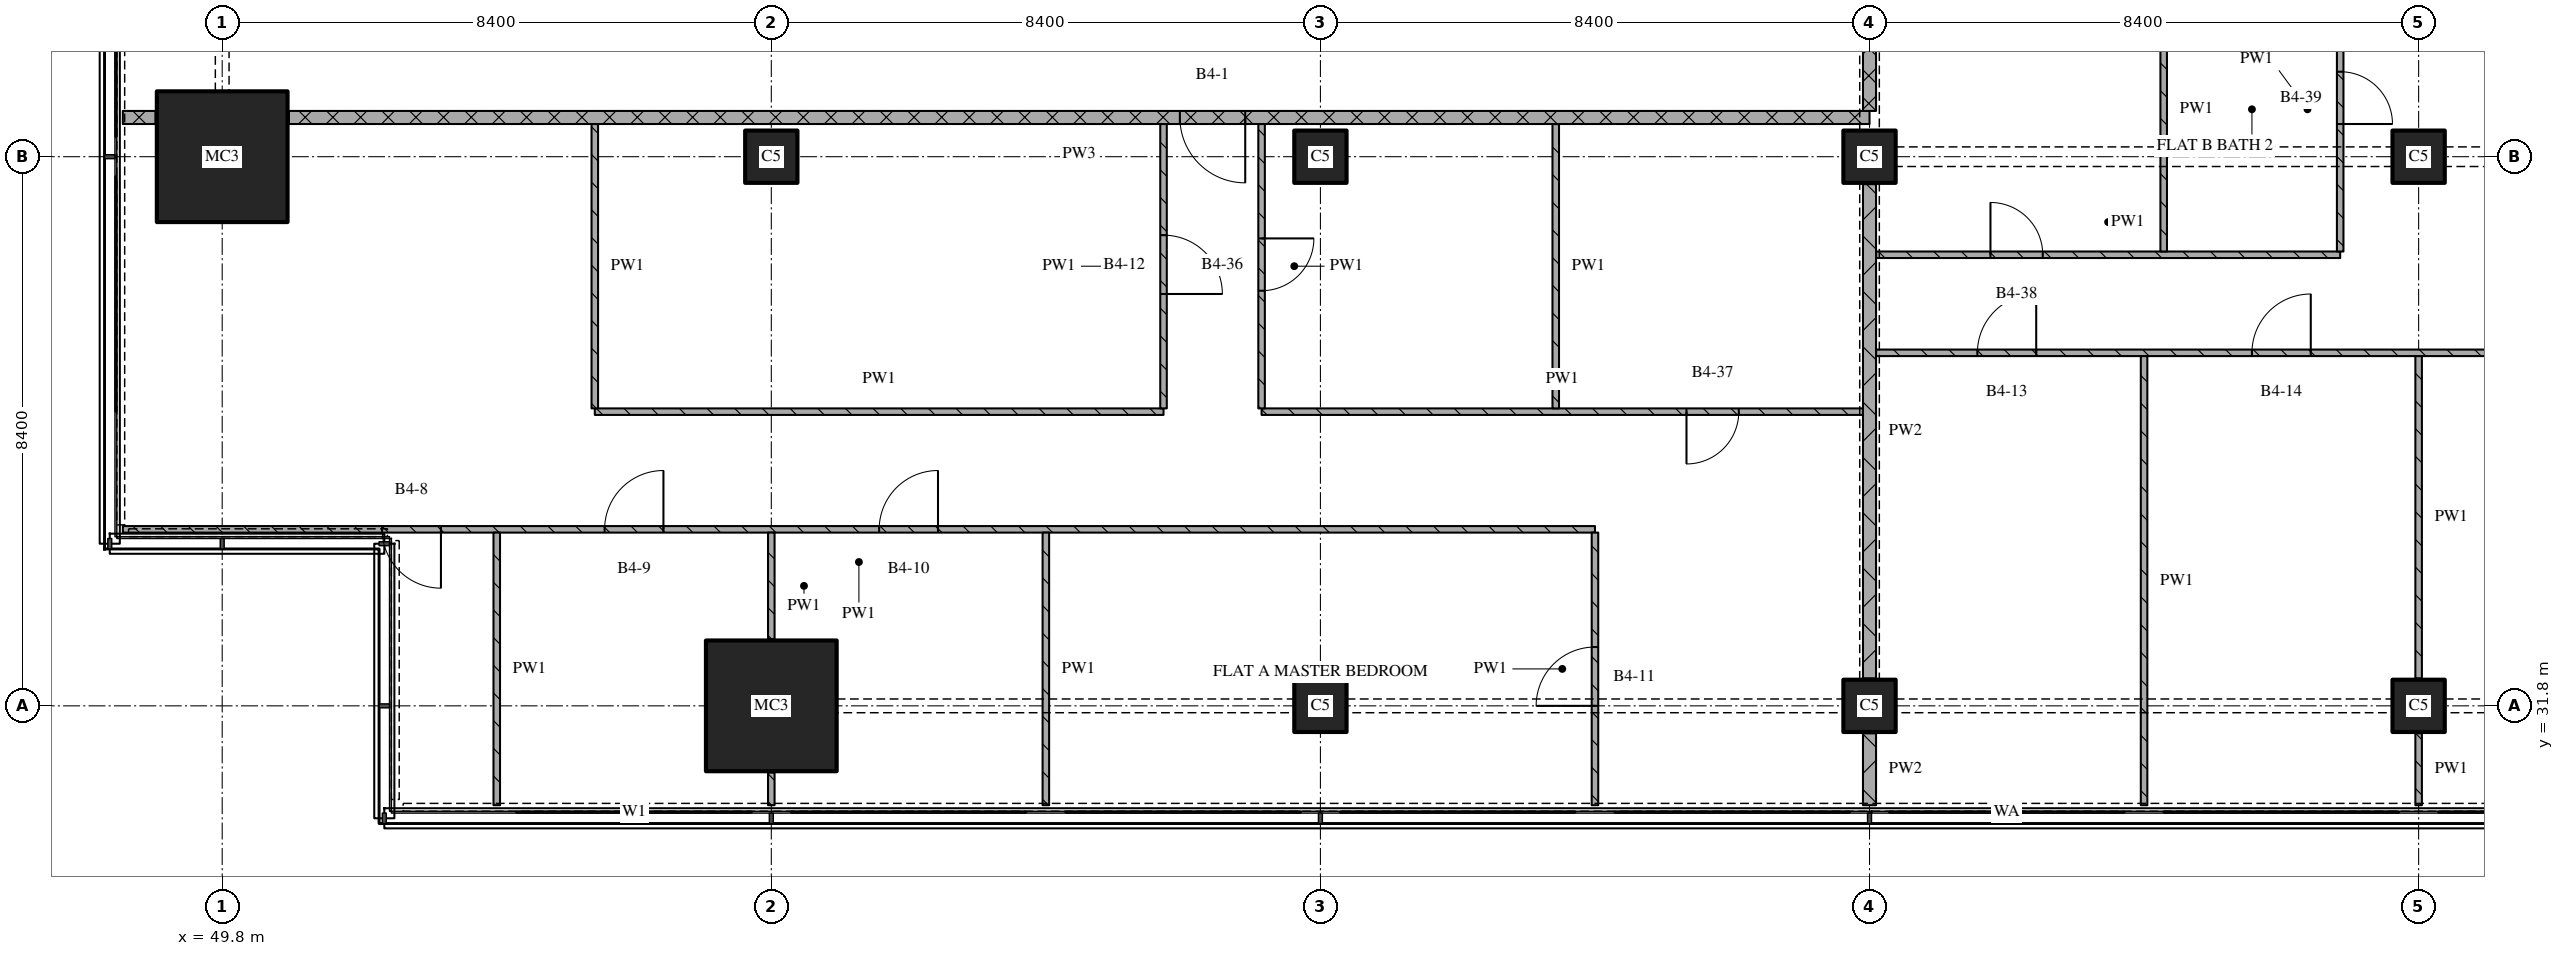
"""IFC4 building model, lengths in metres.
Left out: names, types, materials, properties, quantities, classifications, styles, units other than length and angle.
Written with IfcOpenShell. Run it as: python <this file> out.ifc"""

import sys

from ifc_helpers import new_model, si_unit, direction, frame, frame_2d, origin, origin_2d, place, context, subcontext, project, spatial, rectangle, extrude, element, fill, save


model = new_model("IFC4")
c1 = context("Model", 3, precision=1e-05, world=origin(), true_north=direction((0.0, 1.0)))
c2 = subcontext(c1, "Body", "Model", "MODEL_VIEW")
j1 = project(units=[si_unit("LENGTHUNIT", "METRE"), si_unit("PLANEANGLEUNIT", "RADIAN")], contexts=[c1])
p1 = place(None, origin())
s1 = spatial("IfcSite", under=j1, at=p1, CompositionType="ELEMENT")
p2 = place(p1, origin())
s2 = spatial("IfcBuilding", under=s1, at=p2, CompositionType="ELEMENT")
p3 = place(p2, frame((0.0, 0.0, 127.65)))
s3 = spatial("IfcBuildingStorey", under=s2, at=p3, CompositionType="ELEMENT", Elevation=127.65)
for number, where, z_axis, x_axis in (
    (1, (49.8, 40.2, 0.0), (0.0, 0.0, 1.0), (1.0, 0.0, 0.0)),
    (2, (58.2, 31.8, 0.0), (0.0, 0.0, 1.0), (1.0, 0.0, 0.0)),
):
    element("IfcColumn", number, at=place(p3, frame(where, z_axis=z_axis, x_axis=x_axis)), inside=s3, PredefinedType="COLUMN", context=c2, shape_type="SweptSolid", body=[
        extrude(rectangle(XDim=2.0, YDim=2.0, at=origin_2d()), origin(), (0.0, 0.0, 1.0), 3.6),
    ])
for number, where, z_axis, x_axis in (
    (3, (58.2, 40.2, 0.0), (0.0, 0.0, 1.0), (1.0, 0.0, 0.0)),
    (4, (66.6, 31.8, 0.0), (0.0, 0.0, 1.0), (1.0, 0.0, 0.0)),
    (5, (66.6, 40.2, 0.0), (0.0, 0.0, 1.0), (1.0, 0.0, 0.0)),
    (6, (75.0, 31.8, 0.0), (0.0, 0.0, 1.0), (1.0, 0.0, 0.0)),
    (7, (75.0, 40.2, 0.0), (0.0, 0.0, 1.0), (1.0, 0.0, 0.0)),
    (8, (83.4, 31.8, 0.0), (0.0, 0.0, 1.0), (1.0, 0.0, 0.0)),
    (9, (83.4, 40.2, 0.0), (0.0, 0.0, 1.0), (1.0, 0.0, 0.0)),
):
    element("IfcColumn", number, at=place(p3, frame(where, z_axis=z_axis, x_axis=x_axis)), inside=s3, PredefinedType="COLUMN", context=c2, shape_type="SweptSolid", body=[
        extrude(rectangle(XDim=0.8, YDim=0.8, at=origin_2d()), origin(), (0.0, 0.0, 1.0), 3.6),
    ])
p4 = place(p3, frame((70.8, 34.5, 0.0), z_axis=(0.0, 0.0, 1.0), x_axis=(-1.0, 0.0, 0.0)))
e10 = element("IfcWall", 10, at=p4, inside=s3, PredefinedType="PARTITIONING", context=c2, shape_type="SweptSolid", body=[
    extrude(rectangle(XDim=22.52, YDim=0.1, at=frame_2d((11.26, 0.0))), origin(), (0.0, 0.0, 1.0), 3.32),
])
p5 = place(p4, frame((10.05, 0.0, 0.0)))
e11 = element("IfcOpeningElement", 11, at=p5, cuts=e10, PredefinedType="OPENING", context=c2, shape_type="SweptSolid", body=[
    extrude(rectangle(XDim=0.9, YDim=2.1, at=frame_2d((0.45, 1.05))), frame((0.0, 0.06, 0.0), z_axis=(0.0, -1.0, 0.0), x_axis=(1.0, 0.0, 0.0)), (0.0, 0.0, 1.0), 0.12),
])
p6 = place(p4, frame((14.25, 0.0, 0.0)))
e12 = element("IfcOpeningElement", 12, at=p6, cuts=e10, PredefinedType="OPENING", context=c2, shape_type="SweptSolid", body=[
    extrude(rectangle(XDim=0.9, YDim=2.1, at=frame_2d((0.45, 1.05))), frame((0.0, 0.06, 0.0), z_axis=(0.0, -1.0, 0.0), x_axis=(1.0, 0.0, 0.0)), (0.0, 0.0, 1.0), 0.12),
])
p7 = place(p4, frame((17.654, 0.0, 0.0)))
e13 = element("IfcOpeningElement", 13, at=p7, cuts=e10, PredefinedType="OPENING", context=c2, shape_type="SweptSolid", body=[
    extrude(rectangle(XDim=0.9, YDim=2.1, at=frame_2d((0.45, 1.05))), frame((0.0, 0.06, 0.0), z_axis=(0.0, -1.0, 0.0), x_axis=(1.0, 0.0, 0.0)), (0.0, 0.0, 1.0), 0.12),
])
p8 = place(p3, frame((55.5, 36.3, 0.0), z_axis=(0.0, 0.0, 1.0), x_axis=(1.0, 0.0, 0.0)))
e14 = element("IfcWall", 14, at=p8, inside=s3, PredefinedType="PARTITIONING", context=c2, shape_type="SweptSolid", body=[
    extrude(rectangle(XDim=8.7, YDim=0.1, at=frame_2d((4.35, 0.0))), origin(), (0.0, 0.0, 1.0), 3.32),
])
p9 = place(p3, frame((65.7, 36.3, 0.0), z_axis=(0.0, 0.0, 1.0), x_axis=(1.0, 0.0, 0.0)))
e15 = element("IfcWall", 15, at=p9, inside=s3, PredefinedType="PARTITIONING", context=c2, shape_type="SweptSolid", body=[
    extrude(rectangle(XDim=9.2, YDim=0.1, at=frame_2d((4.6, 0.0))), origin(), (0.0, 0.0, 1.0), 3.32),
])
p10 = place(p9, frame((6.5, 0.0, 0.0)))
e16 = element("IfcOpeningElement", 16, at=p10, cuts=e15, PredefinedType="OPENING", context=c2, shape_type="SweptSolid", body=[
    extrude(rectangle(XDim=0.8, YDim=2.1, at=frame_2d((0.4, 1.05))), frame((0.0, 0.06, 0.0), z_axis=(0.0, -1.0, 0.0), x_axis=(1.0, 0.0, 0.0)), (0.0, 0.0, 1.0), 0.12),
])
p11 = place(p3, frame((96.0, 37.2, 0.0), z_axis=(0.0, 0.0, 1.0), x_axis=(-1.0, 0.0, 0.0)))
e17 = element("IfcWall", 17, at=p11, inside=s3, PredefinedType="PARTITIONING", context=c2, shape_type="SweptSolid", body=[
    extrude(rectangle(XDim=20.9, YDim=0.1, at=frame_2d((10.45, 0.0))), origin(), (0.0, 0.0, 1.0), 3.32),
])
p12 = place(p11, frame((10.05, 0.0, 0.0)))
e18 = element("IfcOpeningElement", 18, at=p12, cuts=e17, PredefinedType="OPENING", context=c2, shape_type="SweptSolid", body=[
    extrude(rectangle(XDim=0.9, YDim=2.1, at=frame_2d((0.45, 1.05))), frame((0.0, 0.06, 0.0), z_axis=(0.0, -1.0, 0.0), x_axis=(1.0, 0.0, 0.0)), (0.0, 0.0, 1.0), 0.12),
])
p13 = place(p11, frame((14.25, 0.0, 0.0)))
e19 = element("IfcOpeningElement", 19, at=p13, cuts=e17, PredefinedType="OPENING", context=c2, shape_type="SweptSolid", body=[
    extrude(rectangle(XDim=0.9, YDim=2.1, at=frame_2d((0.45, 1.05))), frame((0.0, 0.06, 0.0), z_axis=(0.0, -1.0, 0.0), x_axis=(1.0, 0.0, 0.0)), (0.0, 0.0, 1.0), 0.12),
])
p14 = place(p11, frame((18.45, 0.0, 0.0)))
e20 = element("IfcOpeningElement", 20, at=p14, cuts=e17, PredefinedType="OPENING", context=c2, shape_type="SweptSolid", body=[
    extrude(rectangle(XDim=0.9, YDim=2.1, at=frame_2d((0.45, 1.05))), frame((0.0, 0.06, 0.0), z_axis=(0.0, -1.0, 0.0), x_axis=(1.0, 0.0, 0.0)), (0.0, 0.0, 1.0), 0.12),
])
p15 = place(p3, frame((75.1, 38.7, 0.0), z_axis=(0.0, 0.0, 1.0), x_axis=(1.0, 0.0, 0.0)))
e21 = element("IfcWall", 21, at=p15, inside=s3, PredefinedType="PARTITIONING", context=c2, shape_type="SweptSolid", body=[
    extrude(rectangle(XDim=7.1, YDim=0.1, at=frame_2d((3.55, 0.0))), origin(), (0.0, 0.0, 1.0), 3.32),
])
p16 = place(p15, frame((1.75, 0.0, 0.0)))
e22 = element("IfcOpeningElement", 22, at=p16, cuts=e21, PredefinedType="OPENING", context=c2, shape_type="SweptSolid", body=[
    extrude(rectangle(XDim=0.8, YDim=2.1, at=frame_2d((0.4, 1.05))), frame((0.0, 0.06, 0.0), z_axis=(0.0, -1.0, 0.0), x_axis=(1.0, 0.0, 0.0)), (0.0, 0.0, 1.0), 0.12),
])
p17 = place(p3, frame((48.28, 40.8, 0.0), z_axis=(0.0, 0.0, 1.0), x_axis=(1.0, 0.0, 0.0)))
e23 = element("IfcWall", 23, at=p17, inside=s3, PredefinedType="PARTITIONING", context=c2, shape_type="SweptSolid", body=[
    extrude(rectangle(XDim=0.5, YDim=0.2, at=frame_2d((0.25, 0.0))), origin(), (0.0, 0.0, 1.0), 3.32),
])
p18 = place(p3, frame((75.0, 40.8, 0.0), z_axis=(0.0, 0.0, 1.0), x_axis=(-1.0, 0.0, 0.0)))
e24 = element("IfcWall", 24, at=p18, inside=s3, PredefinedType="PARTITIONING", context=c2, shape_type="SweptSolid", body=[
    extrude(rectangle(XDim=24.18, YDim=0.2, at=frame_2d((12.09, 0.0))), origin(), (0.0, 0.0, 1.0), 3.32),
])
p19 = place(p18, frame((9.55, 0.0, 0.0)))
e25 = element("IfcOpeningElement", 25, at=p19, cuts=e24, PredefinedType="OPENING", context=c2, shape_type="SweptSolid", body=[
    extrude(rectangle(XDim=1.0, YDim=2.1, at=frame_2d((0.5, 1.05))), frame((0.0, 0.11, 0.0), z_axis=(0.0, -1.0, 0.0), x_axis=(1.0, 0.0, 0.0)), (0.0, 0.0, 1.0), 0.22),
])
p20 = place(p3, frame((54.0, 34.45, 0.0), z_axis=(0.0, 0.0, 1.0), x_axis=(0.0, -1.0, 0.0)))
e26 = element("IfcWall", 26, at=p20, inside=s3, PredefinedType="PARTITIONING", context=c2, shape_type="SweptSolid", body=[
    extrude(rectangle(XDim=4.17, YDim=0.1, at=frame_2d((2.085, 0.0))), origin(), (0.0, 0.0, 1.0), 3.32),
])
p21 = place(p3, frame((55.5, 40.7, 0.0), z_axis=(0.0, 0.0, 1.0), x_axis=(0.0, -1.0, 0.0)))
e27 = element("IfcWall", 27, at=p21, inside=s3, PredefinedType="PARTITIONING", context=c2, shape_type="SweptSolid", body=[
    extrude(rectangle(XDim=4.35, YDim=0.1, at=frame_2d((2.175, 0.0))), origin(), (0.0, 0.0, 1.0), 3.32),
])
p22 = place(p3, frame((58.2, 30.78, 0.0), z_axis=(0.0, 0.0, 1.0), x_axis=(0.0, -1.0, 0.0)))
e28 = element("IfcWall", 28, at=p22, inside=s3, PredefinedType="PARTITIONING", context=c2, shape_type="SweptSolid", body=[
    extrude(rectangle(XDim=0.5, YDim=0.1, at=frame_2d((0.25, 0.0))), origin(), (0.0, 0.0, 1.0), 3.32),
])
p23 = place(p3, frame((58.2, 34.45, 0.0), z_axis=(0.0, 0.0, 1.0), x_axis=(0.0, -1.0, 0.0)))
e29 = element("IfcWall", 29, at=p23, inside=s3, PredefinedType="PARTITIONING", context=c2, shape_type="SweptSolid", body=[
    extrude(rectangle(XDim=1.63, YDim=0.1, at=frame_2d((0.815, 0.0))), origin(), (0.0, 0.0, 1.0), 3.32),
])
p24 = place(p3, frame((62.4, 34.45, 0.0), z_axis=(0.0, 0.0, 1.0), x_axis=(0.0, -1.0, 0.0)))
e30 = element("IfcWall", 30, at=p24, inside=s3, PredefinedType="PARTITIONING", context=c2, shape_type="SweptSolid", body=[
    extrude(rectangle(XDim=4.17, YDim=0.1, at=frame_2d((2.085, 0.0))), origin(), (0.0, 0.0, 1.0), 3.32),
])
p25 = place(p3, frame((64.2, 36.35, 0.0), z_axis=(0.0, 0.0, 1.0), x_axis=(0.0, 1.0, 0.0)))
e31 = element("IfcWall", 31, at=p25, inside=s3, PredefinedType="PARTITIONING", context=c2, shape_type="SweptSolid", body=[
    extrude(rectangle(XDim=4.35, YDim=0.1, at=frame_2d((2.175, 0.0))), origin(), (0.0, 0.0, 1.0), 3.32),
])
p26 = place(p25, frame((1.75, 0.0, 0.0)))
e32 = element("IfcOpeningElement", 32, at=p26, cuts=e31, PredefinedType="OPENING", context=c2, shape_type="SweptSolid", body=[
    extrude(rectangle(XDim=0.9, YDim=2.1, at=frame_2d((0.45, 1.05))), frame((0.0, 0.06, 0.0), z_axis=(0.0, -1.0, 0.0), x_axis=(1.0, 0.0, 0.0)), (0.0, 0.0, 1.0), 0.12),
])
p27 = place(p3, frame((65.7, 40.7, 0.0), z_axis=(0.0, 0.0, 1.0), x_axis=(0.0, -1.0, 0.0)))
e33 = element("IfcWall", 33, at=p27, inside=s3, PredefinedType="PARTITIONING", context=c2, shape_type="SweptSolid", body=[
    extrude(rectangle(XDim=4.35, YDim=0.1, at=frame_2d((2.175, 0.0))), origin(), (0.0, 0.0, 1.0), 3.32),
])
p28 = place(p27, frame((1.75, 0.0, 0.0)))
e34 = element("IfcOpeningElement", 34, at=p28, cuts=e33, PredefinedType="OPENING", context=c2, shape_type="SweptSolid", body=[
    extrude(rectangle(XDim=0.8, YDim=2.1, at=frame_2d((0.4, 1.05))), frame((0.0, 0.06, 0.0), z_axis=(0.0, -1.0, 0.0), x_axis=(1.0, 0.0, 0.0)), (0.0, 0.0, 1.0), 0.12),
])
p29 = place(p3, frame((70.2, 40.7, 0.0), z_axis=(0.0, 0.0, 1.0), x_axis=(0.0, -1.0, 0.0)))
e35 = element("IfcWall", 35, at=p29, inside=s3, PredefinedType="PARTITIONING", context=c2, shape_type="SweptSolid", body=[
    extrude(rectangle(XDim=4.35, YDim=0.1, at=frame_2d((2.175, 0.0))), origin(), (0.0, 0.0, 1.0), 3.32),
])
p30 = place(p3, frame((70.8, 30.28, 0.0), z_axis=(0.0, 0.0, 1.0), x_axis=(0.0, 1.0, 0.0)))
e36 = element("IfcWall", 36, at=p30, inside=s3, PredefinedType="PARTITIONING", context=c2, shape_type="SweptSolid", body=[
    extrude(rectangle(XDim=4.17, YDim=0.1, at=frame_2d((2.085, 0.0))), origin(), (0.0, 0.0, 1.0), 3.32),
])
p31 = place(p30, frame((1.52, 0.0, 0.0)))
e37 = element("IfcOpeningElement", 37, at=p31, cuts=e36, PredefinedType="OPENING", context=c2, shape_type="SweptSolid", body=[
    extrude(rectangle(XDim=0.9, YDim=2.1, at=frame_2d((0.45, 1.05))), frame((0.0, 0.06, 0.0), z_axis=(0.0, -1.0, 0.0), x_axis=(1.0, 0.0, 0.0)), (0.0, 0.0, 1.0), 0.12),
])
p32 = place(p3, frame((75.0, 43.1, 0.0), z_axis=(0.0, 0.0, 1.0), x_axis=(0.0, -1.0, 0.0)))
e38 = element("IfcWall", 38, at=p32, inside=s3, PredefinedType="PARTITIONING", context=c2, shape_type="SweptSolid", body=[
    extrude(rectangle(XDim=2.2, YDim=0.2, at=frame_2d((1.1, 0.0))), origin(), (0.0, 0.0, 1.0), 2.43),
])
p33 = place(p3, frame((75.0, 31.38, 0.0), z_axis=(0.0, 0.0, 1.0), x_axis=(0.0, -1.0, 0.0)))
e39 = element("IfcWall", 39, at=p33, inside=s3, PredefinedType="PARTITIONING", context=c2, shape_type="SweptSolid", body=[
    extrude(rectangle(XDim=1.1, YDim=0.2, at=frame_2d((0.55, 0.0))), origin(), (0.0, 0.0, 1.0), 3.32),
])
p34 = place(p3, frame((75.0, 39.78, 0.0), z_axis=(0.0, 0.0, 1.0), x_axis=(0.0, -1.0, 0.0)))
e40 = element("IfcWall", 40, at=p34, inside=s3, PredefinedType="PARTITIONING", context=c2, shape_type="SweptSolid", body=[
    extrude(rectangle(XDim=7.56, YDim=0.2, at=frame_2d((3.78, 0.0))), origin(), (0.0, 0.0, 1.0), 2.83),
])
p35 = place(p3, frame((79.2, 37.15, 0.0), z_axis=(0.0, 0.0, 1.0), x_axis=(0.0, -1.0, 0.0)))
e41 = element("IfcWall", 41, at=p35, inside=s3, PredefinedType="PARTITIONING", context=c2, shape_type="SweptSolid", body=[
    extrude(rectangle(XDim=6.87, YDim=0.1, at=frame_2d((3.435, 0.0))), origin(), (0.0, 0.0, 1.0), 3.32),
])
p36 = place(p3, frame((79.5, 43.1, 0.0), z_axis=(0.0, 0.0, 1.0), x_axis=(0.0, -1.0, 0.0)))
e42 = element("IfcWall", 42, at=p36, inside=s3, PredefinedType="PARTITIONING", context=c2, shape_type="SweptSolid", body=[
    extrude(rectangle(XDim=4.35, YDim=0.1, at=frame_2d((2.175, 0.0))), origin(), (0.0, 0.0, 1.0), 3.32),
])
p37 = place(p3, frame((82.2, 38.75, 0.0), z_axis=(0.0, 0.0, 1.0), x_axis=(0.0, 1.0, 0.0)))
e43 = element("IfcWall", 43, at=p37, inside=s3, PredefinedType="PARTITIONING", context=c2, shape_type="SweptSolid", body=[
    extrude(rectangle(XDim=4.35, YDim=0.1, at=frame_2d((2.175, 0.0))), origin(), (0.0, 0.0, 1.0), 3.32),
])
p38 = place(p37, frame((1.95, 0.0, 0.0)))
e44 = element("IfcOpeningElement", 44, at=p38, cuts=e43, PredefinedType="OPENING", context=c2, shape_type="SweptSolid", body=[
    extrude(rectangle(XDim=0.8, YDim=2.1, at=frame_2d((0.4, 1.05))), frame((0.0, 0.06, 0.0), z_axis=(0.0, -1.0, 0.0), x_axis=(1.0, 0.0, 0.0)), (0.0, 0.0, 1.0), 0.12),
])
p39 = place(p3, frame((83.4, 31.38, 0.0), z_axis=(0.0, 0.0, 1.0), x_axis=(0.0, -1.0, 0.0)))
e45 = element("IfcWall", 45, at=p39, inside=s3, PredefinedType="PARTITIONING", context=c2, shape_type="SweptSolid", body=[
    extrude(rectangle(XDim=1.1, YDim=0.1, at=frame_2d((0.55, 0.0))), origin(), (0.0, 0.0, 1.0), 3.32),
])
p40 = place(p3, frame((83.4, 37.15, 0.0), z_axis=(0.0, 0.0, 1.0), x_axis=(0.0, -1.0, 0.0)))
e46 = element("IfcWall", 46, at=p40, inside=s3, PredefinedType="PARTITIONING", context=c2, shape_type="SweptSolid", body=[
    extrude(rectangle(XDim=4.93, YDim=0.1, at=frame_2d((2.465, 0.0))), origin(), (0.0, 0.0, 1.0), 3.32),
])
p41 = place(p5, origin())
e47 = element("IfcDoor", 47, at=p41, inside=s3, OperationType="SINGLE_SWING_RIGHT", PredefinedType="DOOR", context=c2, shape_type="SweptSolid", body=[
    extrude(rectangle(XDim=0.9, YDim=2.1, at=frame_2d((0.45, 1.05))), frame((0.0, 0.025, 0.0), z_axis=(0.0, -1.0, 0.0), x_axis=(1.0, 0.0, 0.0)), (0.0, 0.0, 1.0), 0.05),
])
fill(e11, e47)
p42 = place(p6, origin())
e48 = element("IfcDoor", 48, at=p42, inside=s3, OperationType="SINGLE_SWING_RIGHT", PredefinedType="DOOR", context=c2, shape_type="SweptSolid", body=[
    extrude(rectangle(XDim=0.9, YDim=2.1, at=frame_2d((0.45, 1.05))), frame((0.0, 0.025, 0.0), z_axis=(0.0, -1.0, 0.0), x_axis=(1.0, 0.0, 0.0)), (0.0, 0.0, 1.0), 0.05),
])
fill(e12, e48)
p43 = place(p7, origin())
e49 = element("IfcDoor", 49, at=p43, inside=s3, OperationType="SINGLE_SWING_LEFT", PredefinedType="DOOR", context=c2, shape_type="SweptSolid", body=[
    extrude(rectangle(XDim=0.9, YDim=2.1, at=frame_2d((0.45, 1.05))), frame((0.0, 0.025, 0.0), z_axis=(0.0, -1.0, 0.0), x_axis=(1.0, 0.0, 0.0)), (0.0, 0.0, 1.0), 0.05),
])
fill(e13, e49)
p44 = place(p10, origin())
e50 = element("IfcDoor", 50, at=p44, inside=s3, OperationType="SINGLE_SWING_RIGHT", PredefinedType="DOOR", context=c2, shape_type="SweptSolid", body=[
    extrude(rectangle(XDim=0.8, YDim=2.1, at=frame_2d((0.4, 1.05))), frame((0.0, 0.025, 0.0), z_axis=(0.0, -1.0, 0.0), x_axis=(1.0, 0.0, 0.0)), (0.0, 0.0, 1.0), 0.05),
])
fill(e16, e50)
p45 = place(p13, origin())
e51 = element("IfcDoor", 51, at=p45, inside=s3, OperationType="SINGLE_SWING_RIGHT", PredefinedType="DOOR", context=c2, shape_type="SweptSolid", body=[
    extrude(rectangle(XDim=0.9, YDim=2.1, at=frame_2d((0.45, 1.05))), frame((0.0, 0.025, 0.0), z_axis=(0.0, -1.0, 0.0), x_axis=(1.0, 0.0, 0.0)), (0.0, 0.0, 1.0), 0.05),
])
fill(e19, e51)
p46 = place(p14, origin())
e52 = element("IfcDoor", 52, at=p46, inside=s3, OperationType="SINGLE_SWING_RIGHT", PredefinedType="DOOR", context=c2, shape_type="SweptSolid", body=[
    extrude(rectangle(XDim=0.9, YDim=2.1, at=frame_2d((0.45, 1.05))), frame((0.0, 0.025, 0.0), z_axis=(0.0, -1.0, 0.0), x_axis=(1.0, 0.0, 0.0)), (0.0, 0.0, 1.0), 0.05),
])
fill(e20, e52)
p47 = place(p16, origin())
e53 = element("IfcDoor", 53, at=p47, inside=s3, OperationType="SINGLE_SWING_LEFT", PredefinedType="DOOR", context=c2, shape_type="SweptSolid", body=[
    extrude(rectangle(XDim=0.8, YDim=2.1, at=frame_2d((0.4, 1.05))), frame((0.0, 0.025, 0.0), z_axis=(0.0, -1.0, 0.0), x_axis=(1.0, 0.0, 0.0)), (0.0, 0.0, 1.0), 0.05),
])
fill(e22, e53)
p48 = place(p19, origin())
e54 = element("IfcDoor", 54, at=p48, inside=s3, OperationType="SINGLE_SWING_LEFT", PredefinedType="DOOR", context=c2, shape_type="SweptSolid", body=[
    extrude(rectangle(XDim=1.0, YDim=2.1, at=frame_2d((0.5, 1.05))), frame((0.0, 0.025, 0.0), z_axis=(0.0, -1.0, 0.0), x_axis=(1.0, 0.0, 0.0)), (0.0, 0.0, 1.0), 0.05),
])
fill(e25, e54)
p49 = place(p26, origin())
e55 = element("IfcDoor", 55, at=p49, inside=s3, OperationType="SINGLE_SWING_RIGHT", PredefinedType="DOOR", context=c2, shape_type="SweptSolid", body=[
    extrude(rectangle(XDim=0.9, YDim=2.1, at=frame_2d((0.45, 1.05))), frame((0.0, 0.025, 0.0), z_axis=(0.0, -1.0, 0.0), x_axis=(1.0, 0.0, 0.0)), (0.0, 0.0, 1.0), 0.05),
])
fill(e32, e55)
p50 = place(p28, origin())
e56 = element("IfcDoor", 56, at=p50, inside=s3, OperationType="SINGLE_SWING_LEFT", PredefinedType="DOOR", context=c2, shape_type="SweptSolid", body=[
    extrude(rectangle(XDim=0.8, YDim=2.1, at=frame_2d((0.4, 1.05))), frame((0.0, 0.025, 0.0), z_axis=(0.0, -1.0, 0.0), x_axis=(1.0, 0.0, 0.0)), (0.0, 0.0, 1.0), 0.05),
])
fill(e34, e56)
p51 = place(p31, origin())
e57 = element("IfcDoor", 57, at=p51, inside=s3, OperationType="SINGLE_SWING_LEFT", PredefinedType="DOOR", context=c2, shape_type="SweptSolid", body=[
    extrude(rectangle(XDim=0.9, YDim=2.1, at=frame_2d((0.45, 1.05))), frame((0.0, 0.025, 0.0), z_axis=(0.0, -1.0, 0.0), x_axis=(1.0, 0.0, 0.0)), (0.0, 0.0, 1.0), 0.05),
])
fill(e37, e57)
p52 = place(p38, origin())
e58 = element("IfcDoor", 58, at=p52, inside=s3, OperationType="SINGLE_SWING_RIGHT", PredefinedType="DOOR", context=c2, shape_type="SweptSolid", body=[
    extrude(rectangle(XDim=0.8, YDim=2.1, at=frame_2d((0.4, 1.05))), frame((0.0, 0.025, 0.0), z_axis=(0.0, -1.0, 0.0), x_axis=(1.0, 0.0, 0.0)), (0.0, 0.0, 1.0), 0.05),
])
fill(e44, e58)
save(model, sys.argv[1])
